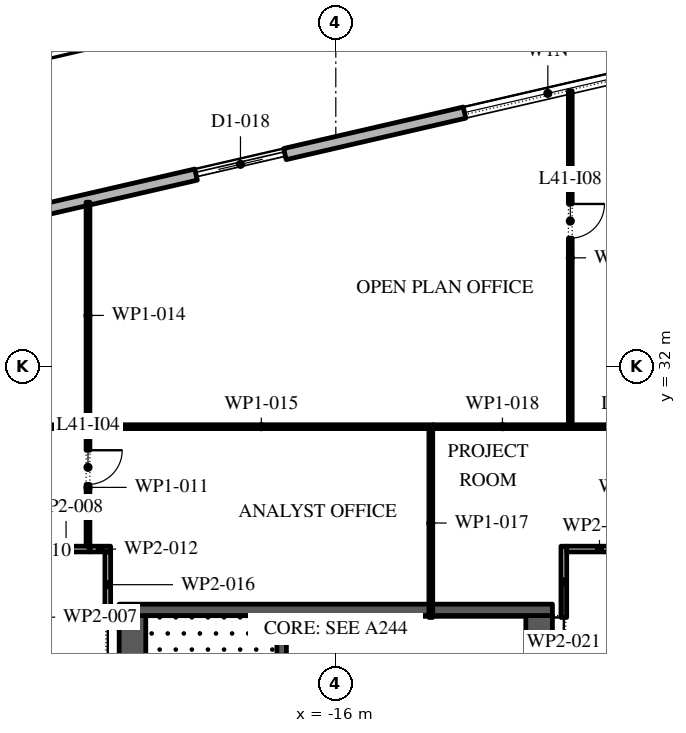
"""IFC4 building model, lengths in metres.
Left out: names, types, materials, properties, quantities, classifications, styles, units other than length and angle.
Written with IfcOpenShell. Run it as: python <this file> out.ifc"""

import sys

from ifc_helpers import new_model, si_unit, direction, frame, frame_2d, origin, place, context, subcontext, project, spatial, rectangle, extrude, element, fill, save


model = new_model("IFC4")
c1 = context("Model", 3, precision=1e-05, world=origin(), true_north=direction((0.0, 1.0)))
c2 = subcontext(c1, "Body", "Model", "MODEL_VIEW")
j1 = project(units=[si_unit("LENGTHUNIT", "METRE"), si_unit("PLANEANGLEUNIT", "RADIAN")], contexts=[c1])
p1 = place(None, origin())
s1 = spatial("IfcSite", under=j1, at=p1, CompositionType="ELEMENT")
p2 = place(p1, origin())
s2 = spatial("IfcBuilding", under=s1, at=p2, CompositionType="ELEMENT")
p3 = place(p2, frame((0.0, 0.0, 188.4)))
s3 = spatial("IfcBuildingStorey", under=s2, at=p3, CompositionType="ELEMENT", Elevation=188.4)
p4 = place(p3, frame((17.592, 45.657, 0.0), z_axis=(0.0, 0.0, 1.0), x_axis=(-0.974370243697, -0.224950279389, 0.0)))
e1 = element("IfcWall", 1, at=p4, inside=s3, PredefinedType="STANDARD", context=c2, shape_type="SweptSolid", body=[
    extrude(rectangle(XDim=49.5, YDim=0.3, at=frame_2d((24.75, 0.0))), origin(), (0.0, 0.0, 1.0), 4.0),
])
p5 = place(p4, frame((2.8, 0.0, 0.0)))
e2 = element("IfcOpeningElement", 2, at=p5, cuts=e1, PredefinedType="OPENING", context=c2, shape_type="SweptSolid", body=[
    extrude(rectangle(XDim=2.4, YDim=3.5, at=frame_2d((1.2, 1.75))), frame((0.0, 0.16, 0.0), z_axis=(0.0, -1.0, 0.0), x_axis=(1.0, 0.0, 0.0)), (0.0, 0.0, 1.0), 0.32),
])
p6 = place(p4, frame((9.9, 0.0, 0.45)))
e3 = element("IfcOpeningElement", 3, at=p6, cuts=e1, PredefinedType="OPENING", context=c2, shape_type="SweptSolid", body=[
    extrude(rectangle(XDim=4.5, YDim=2.45, at=frame_2d((2.25, 1.225))), frame((0.0, 0.16, 0.0), z_axis=(0.0, -1.0, 0.0), x_axis=(1.0, 0.0, 0.0)), (0.0, 0.0, 1.0), 0.32),
])
p7 = place(p4, frame((18.2, 0.0, 0.45)))
e4 = element("IfcOpeningElement", 4, at=p7, cuts=e1, PredefinedType="OPENING", context=c2, shape_type="SweptSolid", body=[
    extrude(rectangle(XDim=4.5, YDim=2.45, at=frame_2d((2.25, 1.225))), frame((0.0, 0.16, 0.0), z_axis=(0.0, -1.0, 0.0), x_axis=(1.0, 0.0, 0.0)), (0.0, 0.0, 1.0), 0.32),
])
p8 = place(p4, frame((26.5, 0.0, 0.45)))
e5 = element("IfcOpeningElement", 5, at=p8, cuts=e1, PredefinedType="OPENING", context=c2, shape_type="SweptSolid", body=[
    extrude(rectangle(XDim=4.5, YDim=2.525, at=frame_2d((2.25, 1.262))), frame((0.0, 0.16, 0.0), z_axis=(0.0, -1.0, 0.0), x_axis=(1.0, 0.0, 0.0)), (0.0, 0.0, 1.0), 0.32),
])
p9 = place(p4, frame((35.85, 0.0, 0.0)))
e6 = element("IfcOpeningElement", 6, at=p9, cuts=e1, PredefinedType="OPENING", context=c2, shape_type="SweptSolid", body=[
    extrude(rectangle(XDim=2.4, YDim=3.5, at=frame_2d((1.2, 1.75))), frame((0.0, 0.16, 0.0), z_axis=(0.0, -1.0, 0.0), x_axis=(1.0, 0.0, 0.0)), (0.0, 0.0, 1.0), 0.32),
])
p10 = place(p4, frame((43.1, 0.0, 0.45)))
e7 = element("IfcOpeningElement", 7, at=p10, cuts=e1, PredefinedType="OPENING", context=c2, shape_type="SweptSolid", body=[
    extrude(rectangle(XDim=4.5, YDim=2.675, at=frame_2d((2.25, 1.337))), frame((0.0, 0.16, 0.0), z_axis=(0.0, -1.0, 0.0), x_axis=(1.0, 0.0, 0.0)), (0.0, 0.0, 1.0), 0.32),
])
p11 = place(p3, frame((-33.157, 30.092, 0.0), z_axis=(0.0, 0.0, 1.0), x_axis=(0.224950279389, -0.974370243697, 0.0)))
e8 = element("IfcWall", 8, at=p11, inside=s3, PredefinedType="STANDARD", context=c2, shape_type="SweptSolid", body=[
    extrude(rectangle(XDim=49.5, YDim=0.3, at=frame_2d((24.75, 0.0))), origin(), (0.0, 0.0, 1.0), 4.0),
])
p12 = place(p11, frame((2.207, 0.0, 0.0)))
e9 = element("IfcOpeningElement", 9, at=p12, cuts=e8, PredefinedType="OPENING", context=c2, shape_type="SweptSolid", body=[
    extrude(rectangle(XDim=2.4, YDim=3.5, at=frame_2d((1.2, 1.75))), frame((0.0, 0.16, 0.0), z_axis=(0.0, -1.0, 0.0), x_axis=(1.0, 0.0, 0.0)), (0.0, 0.0, 1.0), 0.32),
])
p13 = place(p11, frame((8.121, 0.0, 0.45)))
e10 = element("IfcOpeningElement", 10, at=p13, cuts=e8, PredefinedType="OPENING", context=c2, shape_type="SweptSolid", body=[
    extrude(rectangle(XDim=4.5, YDim=2.825, at=frame_2d((2.25, 1.413))), frame((0.0, 0.16, 0.0), z_axis=(0.0, -1.0, 0.0), x_axis=(1.0, 0.0, 0.0)), (0.0, 0.0, 1.0), 0.32),
])
p14 = place(p11, frame((15.236, 0.0, 0.45)))
e11 = element("IfcOpeningElement", 11, at=p14, cuts=e8, PredefinedType="OPENING", context=c2, shape_type="SweptSolid", body=[
    extrude(rectangle(XDim=4.5, YDim=2.95, at=frame_2d((2.25, 1.475))), frame((0.0, 0.16, 0.0), z_axis=(0.0, -1.0, 0.0), x_axis=(1.0, 0.0, 0.0)), (0.0, 0.0, 1.0), 0.32),
])
p15 = place(p11, frame((22.35, 0.0, 0.45)))
e12 = element("IfcOpeningElement", 12, at=p15, cuts=e8, PredefinedType="OPENING", context=c2, shape_type="SweptSolid", body=[
    extrude(rectangle(XDim=4.5, YDim=3.0, at=frame_2d((2.25, 1.5))), frame((0.0, 0.16, 0.0), z_axis=(0.0, -1.0, 0.0), x_axis=(1.0, 0.0, 0.0)), (0.0, 0.0, 1.0), 0.32),
])
p16 = place(p11, frame((30.514, 0.0, 0.0)))
e13 = element("IfcOpeningElement", 13, at=p16, cuts=e8, PredefinedType="OPENING", context=c2, shape_type="SweptSolid", body=[
    extrude(rectangle(XDim=2.4, YDim=3.5, at=frame_2d((1.2, 1.75))), frame((0.0, 0.16, 0.0), z_axis=(0.0, -1.0, 0.0), x_axis=(1.0, 0.0, 0.0)), (0.0, 0.0, 1.0), 0.32),
])
p17 = place(p11, frame((36.579, 0.0, 0.45)))
e14 = element("IfcOpeningElement", 14, at=p17, cuts=e8, PredefinedType="OPENING", context=c2, shape_type="SweptSolid", body=[
    extrude(rectangle(XDim=4.5, YDim=3.05, at=frame_2d((2.25, 1.525))), frame((0.0, 0.16, 0.0), z_axis=(0.0, -1.0, 0.0), x_axis=(1.0, 0.0, 0.0)), (0.0, 0.0, 1.0), 0.32),
])
p18 = place(p11, frame((43.693, 0.0, 0.45)))
e15 = element("IfcOpeningElement", 15, at=p18, cuts=e8, PredefinedType="OPENING", context=c2, shape_type="SweptSolid", body=[
    extrude(rectangle(XDim=4.5, YDim=3.05, at=frame_2d((2.25, 1.525))), frame((0.0, 0.16, 0.0), z_axis=(0.0, -1.0, 0.0), x_axis=(1.0, 0.0, 0.0)), (0.0, 0.0, 1.0), 0.32),
])
p19 = place(p3, frame((-21.35, -2.45, 0.0), z_axis=(0.0, 0.0, 1.0), x_axis=(0.0, 1.0, 0.0)))
e16 = element("IfcWall", 16, at=p19, inside=s3, PredefinedType="SHEAR", context=c2, shape_type="SweptSolid", body=[
    extrude(rectangle(XDim=27.9, YDim=0.7, at=frame_2d((13.95, 0.0))), origin(), (0.0, 0.0, 1.0), 4.0),
])
p20 = place(p19, frame((5.05, 0.0, 0.0)))
e17 = element("IfcOpeningElement", 17, at=p20, cuts=e16, PredefinedType="OPENING", context=c2, shape_type="SweptSolid", body=[
    extrude(rectangle(XDim=1.2, YDim=2.1, at=frame_2d((0.6, 1.05))), frame((0.0, 0.36, 0.0), z_axis=(0.0, -1.0, 0.0), x_axis=(1.0, 0.0, 0.0)), (0.0, 0.0, 1.0), 0.72),
])
p21 = place(p19, frame((21.65, 0.0, 0.0)))
e18 = element("IfcOpeningElement", 18, at=p21, cuts=e16, PredefinedType="OPENING", context=c2, shape_type="SweptSolid", body=[
    extrude(rectangle(XDim=1.2, YDim=2.1, at=frame_2d((0.6, 1.05))), frame((0.0, 0.36, 0.0), z_axis=(0.0, -1.0, 0.0), x_axis=(1.0, 0.0, 0.0)), (0.0, 0.0, 1.0), 0.72),
])
p22 = place(p3, frame((-10.65, -2.45, 0.0), z_axis=(0.0, 0.0, 1.0), x_axis=(0.0, 1.0, 0.0)))
e19 = element("IfcWall", 19, at=p22, inside=s3, PredefinedType="SHEAR", context=c2, shape_type="SweptSolid", body=[
    extrude(rectangle(XDim=27.9, YDim=0.7, at=frame_2d((13.95, 0.0))), origin(), (0.0, 0.0, 1.0), 4.0),
])
p23 = place(p22, frame((23.65, 0.0, 0.0)))
e20 = element("IfcOpeningElement", 20, at=p23, cuts=e19, PredefinedType="OPENING", context=c2, shape_type="SweptSolid", body=[
    extrude(rectangle(XDim=2.4, YDim=2.1, at=frame_2d((1.2, 1.05))), frame((0.0, 0.36, 0.0), z_axis=(0.0, -1.0, 0.0), x_axis=(1.0, 0.0, 0.0)), (0.0, 0.0, 1.0), 0.72),
])
p24 = place(p22, frame((0.788, 0.0, 0.0)))
e21 = element("IfcOpeningElement", 21, at=p24, cuts=e19, PredefinedType="OPENING", context=c2, shape_type="SweptSolid", body=[
    extrude(rectangle(XDim=0.9, YDim=2.1, at=frame_2d((0.45, 1.05))), frame((0.0, 0.36, 0.0), z_axis=(0.0, -1.0, 0.0), x_axis=(1.0, 0.0, 0.0)), (0.0, 0.0, 1.0), 0.72),
])
p25 = place(p22, frame((3.962, 0.0, 0.0)))
e22 = element("IfcOpeningElement", 22, at=p25, cuts=e19, PredefinedType="OPENING", context=c2, shape_type="SweptSolid", body=[
    extrude(rectangle(XDim=1.0, YDim=2.1, at=frame_2d((0.5, 1.05))), frame((0.0, 0.36, 0.0), z_axis=(0.0, -1.0, 0.0), x_axis=(1.0, 0.0, 0.0)), (0.0, 0.0, 1.0), 0.72),
])
p26 = place(p3, frame((-21.7, 25.6, 0.0), z_axis=(0.0, 0.0, 1.0), x_axis=(1.0, 0.0, 0.0)))
e23 = element("IfcWall", 23, at=p26, inside=s3, PredefinedType="SHEAR", context=c2, shape_type="SweptSolid", body=[
    extrude(rectangle(XDim=11.4, YDim=0.3, at=frame_2d((5.7, 0.0))), origin(), (0.0, 0.0, 1.0), 4.0),
])
p27 = place(p3, frame((-17.425, 19.15, 0.0), z_axis=(0.0, 0.0, 1.0), x_axis=(0.0, 1.0, 0.0)))
e24 = element("IfcWall", 24, at=p27, inside=s3, PredefinedType="SHEAR", context=c2, shape_type="SweptSolid", body=[
    extrude(rectangle(XDim=6.3, YDim=0.25, at=frame_2d((3.15, 0.0))), origin(), (0.0, 0.0, 1.0), 4.0),
])
p28 = place(p27, frame((0.05, 0.0, 0.0)))
e25 = element("IfcOpeningElement", 25, at=p28, cuts=e24, PredefinedType="OPENING", context=c2, shape_type="SweptSolid", body=[
    extrude(rectangle(XDim=1.2, YDim=2.1, at=frame_2d((0.6, 1.05))), frame((0.0, 0.135, 0.0), z_axis=(0.0, -1.0, 0.0), x_axis=(1.0, 0.0, 0.0)), (0.0, 0.0, 1.0), 0.27),
])
p29 = place(p3, frame((-23.725, 27.2, 0.0), z_axis=(0.0, 0.0, 1.0), x_axis=(1.0, 0.0, 0.0)))
e26 = element("IfcWall", 26, at=p29, inside=s3, PredefinedType="PARTITIONING", context=c2, shape_type="SweptSolid", body=[
    extrude(rectangle(XDim=1.255, YDim=0.15, at=frame_2d((0.627, 0.0))), origin(), (0.0, 0.0, 1.0), 4.0),
])
p30 = place(p3, frame((-22.52, 27.275, 0.0), z_axis=(0.0, 0.0, 1.0), x_axis=(0.0, 1.0, 0.0)))
e27 = element("IfcWall", 27, at=p30, inside=s3, PredefinedType="PARTITIONING", context=c2, shape_type="SweptSolid", body=[
    extrude(rectangle(XDim=3.095, YDim=0.1, at=frame_2d((1.548, 0.0))), origin(), (0.0, 0.0, 1.0), 4.0),
])
p31 = place(p30, frame((1.625, 0.0, 0.0)))
e28 = element("IfcOpeningElement", 28, at=p31, cuts=e27, PredefinedType="OPENING", context=c2, shape_type="SweptSolid", body=[
    extrude(rectangle(XDim=0.9, YDim=2.1, at=frame_2d((0.45, 1.05))), frame((0.0, 0.06, 0.0), z_axis=(0.0, -1.0, 0.0), x_axis=(1.0, 0.0, 0.0)), (0.0, 0.0, 1.0), 0.12),
])
p32 = place(p3, frame((-22.47, 27.2, 0.0), z_axis=(0.0, 0.0, 1.0), x_axis=(1.0, 0.0, 0.0)))
e29 = element("IfcWall", 29, at=p32, inside=s3, PredefinedType="PARTITIONING", context=c2, shape_type="SweptSolid", body=[
    extrude(rectangle(XDim=0.545, YDim=0.15, at=frame_2d((0.272, 0.0))), origin(), (0.0, 0.0, 1.0), 4.0),
])
p33 = place(p3, frame((-22.57, 30.42, 0.0), z_axis=(0.0, 0.0, 1.0), x_axis=(-1.0, 0.0, 0.0)))
e30 = element("IfcWall", 30, at=p33, inside=s3, PredefinedType="PARTITIONING", context=c2, shape_type="SweptSolid", body=[
    extrude(rectangle(XDim=9.412, YDim=0.1, at=frame_2d((4.706, 0.0))), origin(), (0.0, 0.0, 1.0), 4.0),
])
p34 = place(p33, frame((2.65, 0.0, 0.0)))
e31 = element("IfcOpeningElement", 31, at=p34, cuts=e30, PredefinedType="OPENING", context=c2, shape_type="SweptSolid", body=[
    extrude(rectangle(XDim=0.9, YDim=2.1, at=frame_2d((0.45, 1.05))), frame((0.0, 0.06, 0.0), z_axis=(0.0, -1.0, 0.0), x_axis=(1.0, 0.0, 0.0)), (0.0, 0.0, 1.0), 0.12),
])
p35 = place(p3, frame((-22.52, 30.37, 0.0), z_axis=(0.0, 0.0, 1.0), x_axis=(0.0, 1.0, 0.0)))
e32 = element("IfcWall", 32, at=p35, inside=s3, PredefinedType="PARTITIONING", context=c2, shape_type="SweptSolid", body=[
    extrude(rectangle(XDim=5.955, YDim=0.1, at=frame_2d((2.978, 0.0))), origin(), (0.0, 0.0, 1.0), 4.0),
])
p36 = place(p3, frame((-22.47, 30.42, 0.0), z_axis=(0.0, 0.0, 1.0), x_axis=(1.0, 0.0, 0.0)))
e33 = element("IfcWall", 33, at=p36, inside=s3, PredefinedType="PARTITIONING", context=c2, shape_type="SweptSolid", body=[
    extrude(rectangle(XDim=9.02, YDim=0.1, at=frame_2d((4.51, 0.0))), origin(), (0.0, 0.0, 1.0), 4.0),
])
p37 = place(p3, frame((-22.0, 27.125, 0.0), z_axis=(0.0, 0.0, 1.0), x_axis=(0.0, -1.0, 0.0)))
e34 = element("IfcWall", 34, at=p37, inside=s3, PredefinedType="PARTITIONING", context=c2, shape_type="SweptSolid", body=[
    extrude(rectangle(XDim=1.725, YDim=0.15, at=frame_2d((0.863, 0.0))), origin(), (0.0, 0.0, 1.0), 4.0),
])
p38 = place(p3, frame((-13.5, 30.37, 0.0), z_axis=(0.0, 0.0, 1.0), x_axis=(0.0, -1.0, 0.0)))
e35 = element("IfcWall", 35, at=p38, inside=s3, PredefinedType="PARTITIONING", context=c2, shape_type="SweptSolid", body=[
    extrude(rectangle(XDim=4.97, YDim=0.1, at=frame_2d((2.485, 0.0))), origin(), (0.0, 0.0, 1.0), 4.0),
])
p39 = place(p3, frame((-13.45, 30.42, 0.0), z_axis=(0.0, 0.0, 1.0), x_axis=(1.0, 0.0, 0.0)))
e36 = element("IfcWall", 36, at=p39, inside=s3, PredefinedType="PARTITIONING", context=c2, shape_type="SweptSolid", body=[
    extrude(rectangle(XDim=3.67, YDim=0.1, at=frame_2d((1.835, 0.0))), origin(), (0.0, 0.0, 1.0), 4.0),
])
p40 = place(p3, frame((-10.0, 25.4, 0.0), z_axis=(0.0, 0.0, 1.0), x_axis=(0.0, 1.0, 0.0)))
e37 = element("IfcWall", 37, at=p40, inside=s3, PredefinedType="PARTITIONING", context=c2, shape_type="SweptSolid", body=[
    extrude(rectangle(XDim=1.875, YDim=0.15, at=frame_2d((0.938, 0.0))), origin(), (0.0, 0.0, 1.0), 4.0),
])
p41 = place(p3, frame((-9.925, 27.2, 0.0), z_axis=(0.0, 0.0, 1.0), x_axis=(1.0, 0.0, 0.0)))
e38 = element("IfcWall", 38, at=p41, inside=s3, PredefinedType="PARTITIONING", context=c2, shape_type="SweptSolid", body=[
    extrude(rectangle(XDim=1.725, YDim=0.15, at=frame_2d((0.863, 0.0))), origin(), (0.0, 0.0, 1.0), 4.0),
])
p42 = place(p3, frame((-9.83, 30.47, 0.0), z_axis=(0.0, 0.0, 1.0), x_axis=(0.0, 1.0, 0.0)))
e39 = element("IfcWall", 39, at=p42, inside=s3, PredefinedType="PARTITIONING", context=c2, shape_type="SweptSolid", body=[
    extrude(rectangle(XDim=8.785, YDim=0.1, at=frame_2d((4.393, 0.0))), origin(), (0.0, 0.0, 1.0), 4.0),
])
p43 = place(p42, frame((4.91, 0.0, 0.0)))
e40 = element("IfcOpeningElement", 40, at=p43, cuts=e39, PredefinedType="OPENING", context=c2, shape_type="SweptSolid", body=[
    extrude(rectangle(XDim=0.9, YDim=2.1, at=frame_2d((0.45, 1.05))), frame((0.0, 0.06, 0.0), z_axis=(0.0, -1.0, 0.0), x_axis=(1.0, 0.0, 0.0)), (0.0, 0.0, 1.0), 0.12),
])
p44 = place(p3, frame((-9.78, 30.42, 0.0), z_axis=(0.0, 0.0, 1.0), x_axis=(1.0, 0.0, 0.0)))
e41 = element("IfcWall", 41, at=p44, inside=s3, PredefinedType="PARTITIONING", context=c2, shape_type="SweptSolid", body=[
    extrude(rectangle(XDim=3.33, YDim=0.1, at=frame_2d((1.665, 0.0))), origin(), (0.0, 0.0, 1.0), 4.0),
])
p45 = place(p44, frame((1.15, 0.0, 0.0)))
e42 = element("IfcOpeningElement", 42, at=p45, cuts=e41, PredefinedType="OPENING", context=c2, shape_type="SweptSolid", body=[
    extrude(rectangle(XDim=0.9, YDim=2.1, at=frame_2d((0.45, 1.05))), frame((0.0, 0.06, 0.0), z_axis=(0.0, -1.0, 0.0), x_axis=(1.0, 0.0, 0.0)), (0.0, 0.0, 1.0), 0.12),
])
p46 = place(p8, origin())
e43 = element("IfcWindow", 43, at=p46, inside=s3, PartitioningType="DOUBLE_PANEL_VERTICAL", PredefinedType="WINDOW", context=c2, shape_type="SweptSolid", body=[
    extrude(rectangle(XDim=4.5, YDim=2.525, at=frame_2d((2.25, 1.262))), frame((0.0, 0.03, 0.0), z_axis=(0.0, -1.0, 0.0), x_axis=(1.0, 0.0, 0.0)), (0.0, 0.0, 1.0), 0.06),
])
fill(e5, e43)
p47 = place(p9, origin())
e44 = element("IfcDoor", 44, at=p47, inside=s3, OperationType="DOUBLE_DOOR_SLIDING", PredefinedType="DOOR", context=c2, shape_type="SweptSolid", body=[
    extrude(rectangle(XDim=2.4, YDim=3.5, at=frame_2d((1.2, 1.75))), frame((0.0, 0.025, 0.0), z_axis=(0.0, -1.0, 0.0), x_axis=(1.0, 0.0, 0.0)), (0.0, 0.0, 1.0), 0.05),
])
fill(e6, e44)
p48 = place(p31, frame((0.9, 0.0, 0.0), z_axis=(0.0, 0.0, 1.0), x_axis=(-1.0, 0.0, 0.0)))
e45 = element("IfcDoor", 45, at=p48, inside=s3, OperationType="SINGLE_SWING_RIGHT", PredefinedType="DOOR", context=c2, shape_type="SweptSolid", body=[
    extrude(rectangle(XDim=0.9, YDim=2.1, at=frame_2d((0.45, 1.05))), frame((0.0, 0.025, 0.0), z_axis=(0.0, -1.0, 0.0), x_axis=(1.0, 0.0, 0.0)), (0.0, 0.0, 1.0), 0.05),
])
fill(e28, e45)
p49 = place(p43, frame((0.9, 0.0, 0.0), z_axis=(0.0, 0.0, 1.0), x_axis=(-1.0, 0.0, 0.0)))
e46 = element("IfcDoor", 46, at=p49, inside=s3, OperationType="SINGLE_SWING_RIGHT", PredefinedType="DOOR", context=c2, shape_type="SweptSolid", body=[
    extrude(rectangle(XDim=0.9, YDim=2.1, at=frame_2d((0.45, 1.05))), frame((0.0, 0.025, 0.0), z_axis=(0.0, -1.0, 0.0), x_axis=(1.0, 0.0, 0.0)), (0.0, 0.0, 1.0), 0.05),
])
fill(e40, e46)
save(model, sys.argv[1])
